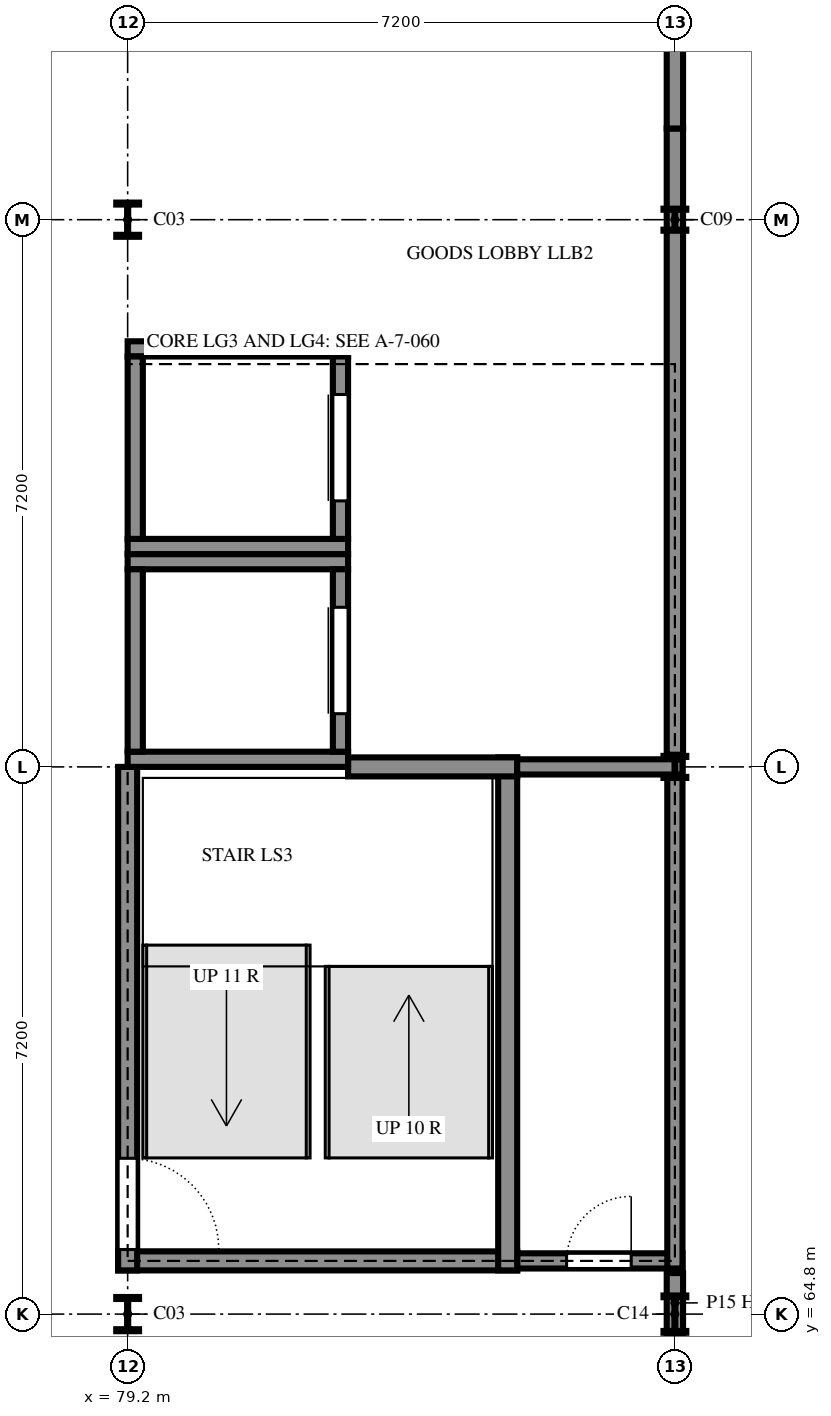
"""IFC4 building model, lengths in metres.
Left out: names, types, materials, properties, quantities, classifications, styles, units other than length and angle.
Written with IfcOpenShell. Run it as: python <this file> out.ifc"""

import sys

from ifc_helpers import new_model, si_unit, direction, frame, frame_2d, origin, origin_2d, place, context, subcontext, project, spatial, rectangle, i_section, extrude, element, fill, save


model = new_model("IFC4")
c1 = context("Model", 3, precision=1e-05, world=origin(), true_north=direction((0.0, 1.0)))
c2 = subcontext(c1, "Body", "Model", "MODEL_VIEW")
j1 = project(units=[si_unit("LENGTHUNIT", "METRE"), si_unit("PLANEANGLEUNIT", "RADIAN")], contexts=[c1])
p1 = place(None, origin())
s1 = spatial("IfcSite", under=j1, at=p1, CompositionType="ELEMENT")
p2 = place(p1, origin())
s2 = spatial("IfcBuilding", under=s1, at=p2, CompositionType="ELEMENT")
p3 = place(p2, frame((0.0, 0.0, 7.2)))
s3 = spatial("IfcBuildingStorey", under=s2, at=p3, CompositionType="ELEMENT", Elevation=7.2)
for number, where, z_axis, x_axis in (
    (1, (79.2, 64.8, 0.0), (0.0, 0.0, 1.0), (1.0, 0.0, 0.0)),
    (2, (79.2, 79.2, 0.0), (0.0, 0.0, 1.0), (1.0, 0.0, 0.0)),
):
    element("IfcColumn", number, at=place(p3, frame(where, z_axis=z_axis, x_axis=x_axis)), inside=s3, PredefinedType="COLUMN", context=c2, shape_type="SweptSolid", body=[
        extrude(i_section(OverallWidth=0.3, OverallDepth=0.45, WebThickness=0.014, FlangeThickness=0.026, FilletRadius=0.027, at=origin_2d()), origin(), (0.0, 0.0, 1.0), 3.6),
    ])
p4 = place(p3, frame((86.4, 64.8, 0.0), z_axis=(0.0, 0.0, 1.0), x_axis=(1.0, 0.0, 0.0)))
e3 = element("IfcColumn", 3, at=p4, inside=s3, PredefinedType="COLUMN", context=c2, shape_type="SweptSolid", body=[
    extrude(i_section(OverallWidth=0.3, OverallDepth=0.49, WebThickness=0.012, FlangeThickness=0.023, FilletRadius=0.027, at=origin_2d()), origin(), (0.0, 0.0, 1.0), 3.6),
])
for number, where, z_axis, x_axis in (
    (4, (86.4, 72.0, 0.0), (0.0, 0.0, 1.0), (1.0, 0.0, 0.0)),
    (5, (86.4, 79.2, 0.0), (0.0, 0.0, 1.0), (1.0, 0.0, 0.0)),
):
    element("IfcColumn", number, at=place(p3, frame(where, z_axis=z_axis, x_axis=x_axis)), inside=s3, PredefinedType="COLUMN", context=c2, shape_type="SweptSolid", body=[
        extrude(i_section(OverallWidth=0.3, OverallDepth=0.29, WebThickness=0.009, FlangeThickness=0.014, FilletRadius=0.027, at=origin_2d()), origin(), (0.0, 0.0, 1.0), 3.6),
    ])
p5 = place(p3, frame((79.075, 65.5, 0.0), z_axis=(0.0, 0.0, 1.0), x_axis=(1.0, 0.0, 0.0)))
e6 = element("IfcWall", 6, at=p5, inside=s3, PredefinedType="SHEAR", context=c2, shape_type="SweptSolid", body=[
    extrude(rectangle(XDim=5.25, YDim=0.25, at=frame_2d((2.625, 0.0))), origin(), (0.0, 0.0, 1.0), 3.6),
])
p6 = place(p3, frame((84.325, 65.5, 0.0), z_axis=(0.0, 0.0, 1.0), x_axis=(1.0, 0.0, 0.0)))
e7 = element("IfcWall", 7, at=p6, inside=s3, PredefinedType="SHEAR", context=c2, shape_type="SweptSolid", body=[
    extrude(rectangle(XDim=2.175, YDim=0.2, at=frame_2d((1.087, 0.0))), origin(), (0.0, 0.0, 1.0), 3.6),
])
p7 = place(p6, frame((0.65, 0.0, 0.0)))
e8 = element("IfcOpeningElement", 8, at=p7, cuts=e7, PredefinedType="OPENING", context=c2, shape_type="SweptSolid", body=[
    extrude(rectangle(XDim=0.85, YDim=2.1, at=frame_2d((0.425, 1.05))), frame((0.0, 0.11, 0.0), z_axis=(0.0, -1.0, 0.0), x_axis=(1.0, 0.0, 0.0)), (0.0, 0.0, 1.0), 0.22),
])
p8 = place(p3, frame((84.2, 65.375, 0.0), z_axis=(0.0, 0.0, 1.0), x_axis=(0.0, 1.0, 0.0)))
e9 = element("IfcWall", 9, at=p8, inside=s3, PredefinedType="SHEAR", context=c2, shape_type="SweptSolid", body=[
    extrude(rectangle(XDim=6.75, YDim=0.25, at=frame_2d((3.375, 0.0))), origin(), (0.0, 0.0, 1.0), 3.6),
])
p9 = place(p3, frame((86.4, 65.4, 0.0), z_axis=(0.0, 0.0, 1.0), x_axis=(0.0, 1.0, 0.0)))
e10 = element("IfcWall", 10, at=p9, inside=s3, PredefinedType="SHEAR", context=c2, shape_type="SweptSolid", body=[
    extrude(rectangle(XDim=6.7, YDim=0.2, at=frame_2d((3.35, 0.0))), origin(), (0.0, 0.0, 1.0), 3.6),
])
p10 = place(p3, frame((79.2, 72.0, 0.0), z_axis=(0.0, 0.0, 1.0), x_axis=(0.0, -1.0, 0.0)))
e11 = element("IfcWall", 11, at=p10, inside=s3, PredefinedType="SHEAR", context=c2, shape_type="SweptSolid", body=[
    extrude(rectangle(XDim=6.625, YDim=0.25, at=frame_2d((3.312, 0.0))), origin(), (0.0, 0.0, 1.0), 3.6),
])
p11 = place(p10, frame((5.15, 0.0, 0.0)))
e12 = element("IfcOpeningElement", 12, at=p11, cuts=e11, PredefinedType="OPENING", context=c2, shape_type="SweptSolid", body=[
    extrude(rectangle(XDim=1.2, YDim=2.4, at=frame_2d((0.6, 1.2))), frame((0.0, 0.135, 0.0), z_axis=(0.0, -1.0, 0.0), x_axis=(1.0, 0.0, 0.0)), (0.0, 0.0, 1.0), 0.27),
])
p12 = place(p3, frame((82.1, 72.0, 0.0), z_axis=(0.0, 0.0, 1.0), x_axis=(1.0, 0.0, 0.0)))
e13 = element("IfcWall", 13, at=p12, inside=s3, PredefinedType="SHEAR", context=c2, shape_type="SweptSolid", body=[
    extrude(rectangle(XDim=2.225, YDim=0.25, at=frame_2d((1.112, 0.0))), origin(), (0.0, 0.0, 1.0), 3.6),
])
p13 = place(p3, frame((86.5, 72.0, 0.0), z_axis=(0.0, 0.0, 1.0), x_axis=(-1.0, 0.0, 0.0)))
e14 = element("IfcWall", 14, at=p13, inside=s3, PredefinedType="SHEAR", context=c2, shape_type="SweptSolid", body=[
    extrude(rectangle(XDim=2.175, YDim=0.2, at=frame_2d((1.087, 0.0))), origin(), (0.0, 0.0, 1.0), 3.6),
])
for number, where, z_axis, x_axis in (
    (15, (79.2, 72.1, 0.0), (0.0, 0.0, 1.0), (1.0, 0.0, 0.0)),
    (16, (79.2, 74.7, 0.0), (0.0, 0.0, 1.0), (1.0, 0.0, 0.0)),
):
    element("IfcWall", number, at=place(p3, frame(where, z_axis=z_axis, x_axis=x_axis)), inside=s3, PredefinedType="SHEAR", context=c2, shape_type="SweptSolid", body=[
        extrude(rectangle(XDim=2.9, YDim=0.2, at=frame_2d((1.45, 0.0))), origin(), (0.0, 0.0, 1.0), 3.6),
    ])
p14 = place(p3, frame((79.3, 72.2, 0.0), z_axis=(0.0, 0.0, 1.0), x_axis=(0.0, 1.0, 0.0)))
e17 = element("IfcWall", 17, at=p14, inside=s3, PredefinedType="SHEAR", context=c2, shape_type="SweptSolid", body=[
    extrude(rectangle(XDim=2.4, YDim=0.2, at=frame_2d((1.2, 0.0))), origin(), (0.0, 0.0, 1.0), 3.6),
])
p15 = place(p3, frame((82.0, 72.2, 0.0), z_axis=(0.0, 0.0, 1.0), x_axis=(0.0, 1.0, 0.0)))
e18 = element("IfcWall", 18, at=p15, inside=s3, PredefinedType="SHEAR", context=c2, shape_type="SweptSolid", body=[
    extrude(rectangle(XDim=2.4, YDim=0.2, at=frame_2d((1.2, 0.0))), origin(), (0.0, 0.0, 1.0), 3.6),
])
p16 = place(p15, frame((0.5, 0.0, 0.0)))
e19 = element("IfcOpeningElement", 19, at=p16, cuts=e18, PredefinedType="OPENING", context=c2, shape_type="SweptSolid", body=[
    extrude(rectangle(XDim=1.4, YDim=2.1, at=frame_2d((0.7, 1.05))), frame((0.0, 0.11, 0.0), z_axis=(0.0, -1.0, 0.0), x_axis=(1.0, 0.0, 0.0)), (0.0, 0.0, 1.0), 0.22),
])
for number, where, z_axis, x_axis in (
    (20, (79.2, 74.9, 0.0), (0.0, 0.0, 1.0), (1.0, 0.0, 0.0)),
    (21, (79.2, 77.5, 0.0), (0.0, 0.0, 1.0), (1.0, 0.0, 0.0)),
):
    element("IfcWall", number, at=place(p3, frame(where, z_axis=z_axis, x_axis=x_axis)), inside=s3, PredefinedType="SHEAR", context=c2, shape_type="SweptSolid", body=[
        extrude(rectangle(XDim=2.9, YDim=0.2, at=frame_2d((1.45, 0.0))), origin(), (0.0, 0.0, 1.0), 3.6),
    ])
p17 = place(p3, frame((79.3, 75.0, 0.0), z_axis=(0.0, 0.0, 1.0), x_axis=(0.0, 1.0, 0.0)))
e22 = element("IfcWall", 22, at=p17, inside=s3, PredefinedType="SHEAR", context=c2, shape_type="SweptSolid", body=[
    extrude(rectangle(XDim=2.4, YDim=0.2, at=frame_2d((1.2, 0.0))), origin(), (0.0, 0.0, 1.0), 3.6),
])
p18 = place(p3, frame((82.0, 75.0, 0.0), z_axis=(0.0, 0.0, 1.0), x_axis=(0.0, 1.0, 0.0)))
e23 = element("IfcWall", 23, at=p18, inside=s3, PredefinedType="SHEAR", context=c2, shape_type="SweptSolid", body=[
    extrude(rectangle(XDim=2.4, YDim=0.2, at=frame_2d((1.2, 0.0))), origin(), (0.0, 0.0, 1.0), 3.6),
])
p19 = place(p18, frame((0.5, 0.0, 0.0)))
e24 = element("IfcOpeningElement", 24, at=p19, cuts=e23, PredefinedType="OPENING", context=c2, shape_type="SweptSolid", body=[
    extrude(rectangle(XDim=1.4, YDim=2.1, at=frame_2d((0.7, 1.05))), frame((0.0, 0.11, 0.0), z_axis=(0.0, -1.0, 0.0), x_axis=(1.0, 0.0, 0.0)), (0.0, 0.0, 1.0), 0.22),
])
p20 = place(p3, frame((86.4, 80.4, 0.0), z_axis=(0.0, 0.0, 1.0), x_axis=(0.0, -1.0, 0.0)))
e25 = element("IfcWall", 25, at=p20, inside=s3, PredefinedType="PARTITIONING", context=c2, shape_type="SweptSolid", body=[
    extrude(rectangle(XDim=8.24, YDim=0.215, at=frame_2d((4.12, 0.0))), origin(), (0.0, 0.0, 1.0), 3.12),
])
p21 = place(p3, frame((86.4, 80.4, 0.0), z_axis=(0.0, 0.0, 1.0), x_axis=(0.0, 1.0, 0.0)))
e26 = element("IfcWall", 26, at=p21, inside=s3, PredefinedType="PARTITIONING", context=c2, shape_type="SweptSolid", body=[
    extrude(rectangle(XDim=11.34, YDim=0.215, at=frame_2d((5.67, 0.0))), origin(), (0.0, 0.0, 1.0), 3.12),
])
p22 = place(p3, frame((86.4, 57.845, 0.0), z_axis=(0.0, 0.0, 1.0), x_axis=(0.0, 1.0, 0.0)))
e27 = element("IfcWall", 27, at=p22, inside=s3, PredefinedType="PARTITIONING", context=c2, shape_type="SweptSolid", body=[
    extrude(rectangle(XDim=6.71, YDim=0.215, at=frame_2d((3.355, 0.0))), origin(), (0.0, 0.0, 1.0), 3.12),
])
p23 = place(p3, frame((86.4, 64.555, 0.0), z_axis=(0.0, 0.0, 1.0), x_axis=(0.0, 1.0, 0.0)))
e28 = element("IfcWall", 28, at=p23, inside=s3, PredefinedType="PARTITIONING", context=c2, shape_type="SweptSolid", body=[
    extrude(rectangle(XDim=0.785, YDim=0.215, at=frame_2d((0.393, 0.0))), origin(), (0.0, 0.0, 1.0), 3.6),
])
p24 = place(p16, origin())
e29 = element("IfcDoor", 29, at=p24, inside=s3, OperationType="SLIDING_TO_LEFT", PredefinedType="DOOR", context=c2, shape_type="SweptSolid", body=[
    extrude(rectangle(XDim=1.4, YDim=2.1, at=frame_2d((0.7, 1.05))), frame((0.0, 0.025, 0.0), z_axis=(0.0, -1.0, 0.0), x_axis=(1.0, 0.0, 0.0)), (0.0, 0.0, 1.0), 0.05),
])
fill(e19, e29)
p25 = place(p19, origin())
e30 = element("IfcDoor", 30, at=p25, inside=s3, OperationType="SLIDING_TO_LEFT", PredefinedType="DOOR", context=c2, shape_type="SweptSolid", body=[
    extrude(rectangle(XDim=1.4, YDim=2.1, at=frame_2d((0.7, 1.05))), frame((0.0, 0.025, 0.0), z_axis=(0.0, -1.0, 0.0), x_axis=(1.0, 0.0, 0.0)), (0.0, 0.0, 1.0), 0.05),
])
fill(e24, e30)
p26 = place(p11, origin())
e31 = element("IfcDoor", 31, at=p26, inside=s3, OperationType="SINGLE_SWING_LEFT", PredefinedType="DOOR", context=c2, shape_type="SweptSolid", body=[
    extrude(rectangle(XDim=1.2, YDim=2.4, at=frame_2d((0.6, 1.2))), frame((0.0, 0.025, 0.0), z_axis=(0.0, -1.0, 0.0), x_axis=(1.0, 0.0, 0.0)), (0.0, 0.0, 1.0), 0.05),
])
fill(e12, e31)
p27 = place(p7, origin())
e32 = element("IfcDoor", 32, at=p27, inside=s3, OperationType="SINGLE_SWING_LEFT", PredefinedType="DOOR", context=c2, shape_type="SweptSolid", body=[
    extrude(rectangle(XDim=0.85, YDim=2.1, at=frame_2d((0.425, 1.05))), frame((0.0, 0.025, 0.0), z_axis=(0.0, -1.0, 0.0), x_axis=(1.0, 0.0, 0.0)), (0.0, 0.0, 1.0), 0.05),
])
fill(e8, e32)
save(model, sys.argv[1])
